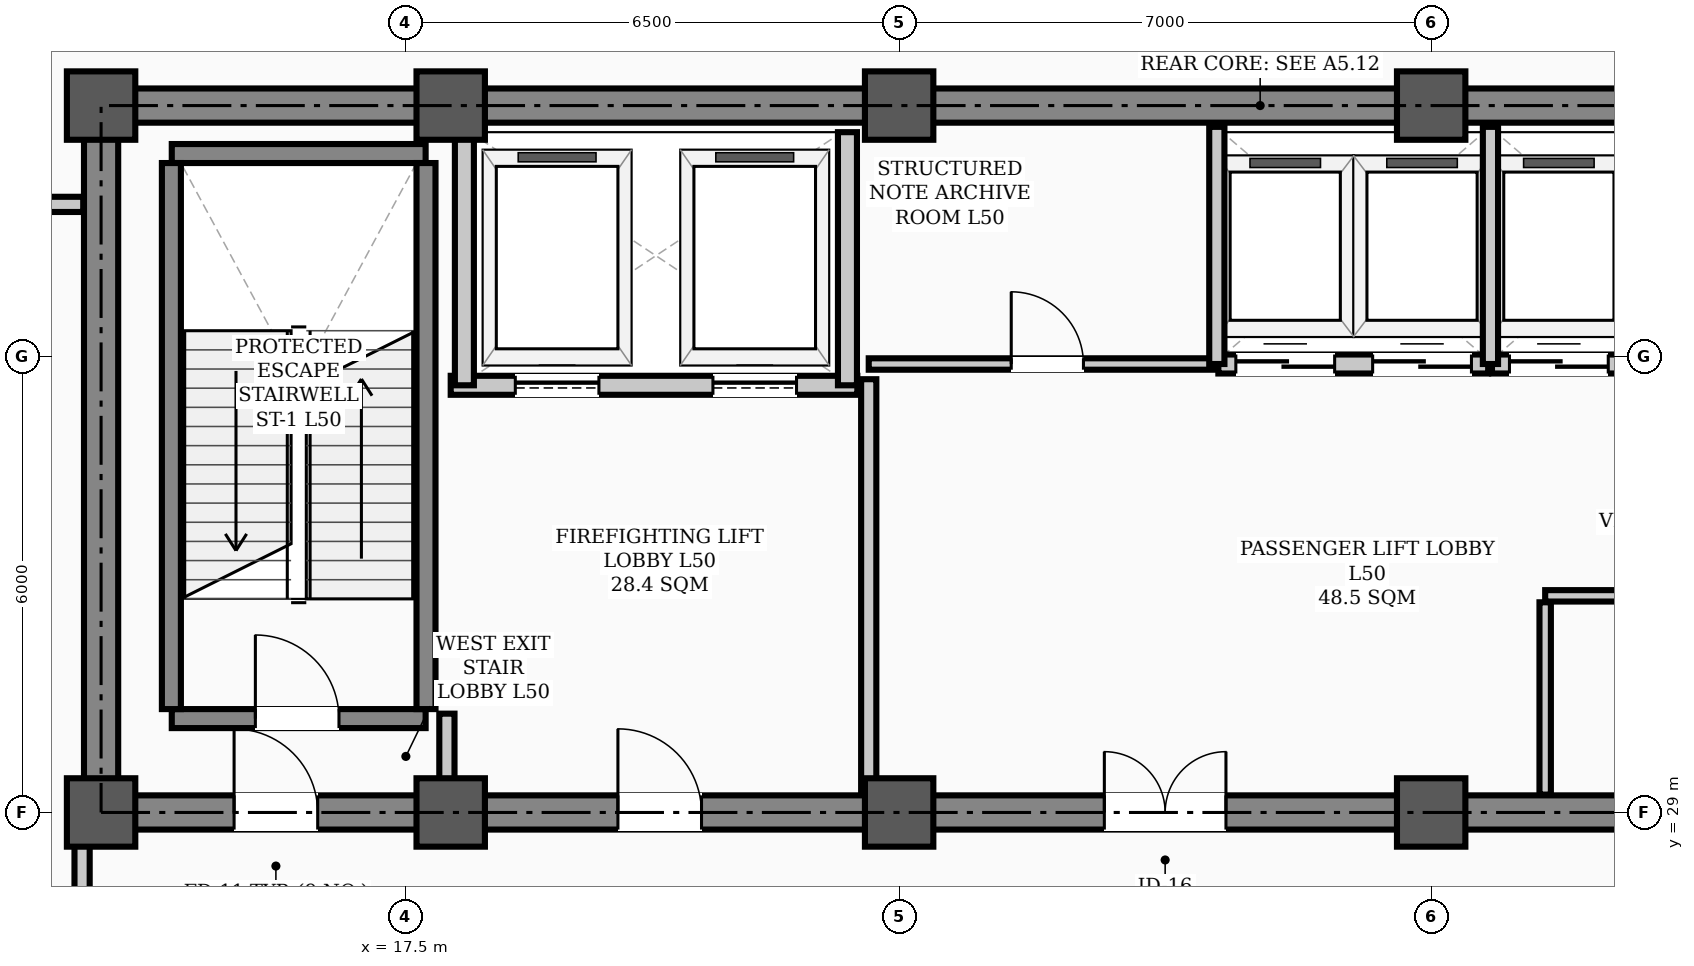
"""IFC4 building model, lengths in metres.
Left out: names, types, materials, properties, quantities, classifications, styles, units other than length and angle.
Written with IfcOpenShell. Run it as: python <this file> out.ifc"""

import sys

from ifc_helpers import new_model, si_unit, direction, frame, frame_2d, origin, origin_2d, place, context, subcontext, project, spatial, rectangle, hollow_rectangle, extrude, element, fill, save


model = new_model("IFC4")
c1 = context("Model", 3, precision=1e-05, world=origin(), true_north=direction((0.0, 1.0)))
c2 = subcontext(c1, "Body", "Model", "MODEL_VIEW")
j1 = project(units=[si_unit("LENGTHUNIT", "METRE"), si_unit("PLANEANGLEUNIT", "RADIAN")], contexts=[c1])
p1 = place(None, origin())
s1 = spatial("IfcSite", under=j1, at=p1, CompositionType="ELEMENT")
p2 = place(p1, origin())
s2 = spatial("IfcBuilding", under=s1, at=p2, CompositionType="ELEMENT")
p3 = place(p2, frame((0.0, 0.0, 200.7)))
s3 = spatial("IfcBuildingStorey", under=s2, at=p3, CompositionType="ELEMENT", Elevation=200.7)
for number, where, z_axis, x_axis in (
    (1, (13.5, 29.0, 0.0), (0.0, 0.0, 1.0), (1.0, 0.0, 0.0)),
    (2, (13.5, 38.3, 0.0), (0.0, 0.0, 1.0), (1.0, 0.0, 0.0)),
    (3, (18.1, 29.0, 0.0), (0.0, 0.0, 1.0), (1.0, 0.0, 0.0)),
    (4, (18.1, 38.3, 0.0), (0.0, 0.0, 1.0), (1.0, 0.0, 0.0)),
    (5, (24.0, 29.0, 0.0), (0.0, 0.0, 1.0), (1.0, 0.0, 0.0)),
    (6, (24.0, 38.3, 0.0), (0.0, 0.0, 1.0), (1.0, 0.0, 0.0)),
    (7, (31.0, 29.0, 0.0), (0.0, 0.0, 1.0), (1.0, 0.0, 0.0)),
    (8, (31.0, 38.3, 0.0), (0.0, 0.0, 1.0), (1.0, 0.0, 0.0)),
):
    element("IfcColumn", number, at=place(p3, frame(where, z_axis=z_axis, x_axis=x_axis)), inside=s3, PredefinedType="COLUMN", context=c2, shape_type="SweptSolid", body=[
        extrude(hollow_rectangle(XDim=0.9, YDim=0.9, WallThickness=0.035, InnerFilletRadius=0.017, OuterFilletRadius=0.052, at=origin_2d()), origin(), (0.0, 0.0, 1.0), 5.4),
    ])
p4 = place(p3, frame((13.5, 29.0, 0.0), z_axis=(0.0, 0.0, 1.0), x_axis=(1.0, 0.0, 0.0)))
e9 = element("IfcWall", 9, at=p4, inside=s3, PredefinedType="SHEAR", context=c2, shape_type="SweptSolid", body=[
    extrude(rectangle(XDim=30.5, YDim=0.45, at=frame_2d((15.25, 0.0))), origin(), (0.0, 0.0, 1.0), 5.22),
])
p5 = place(p4, frame((1.75, 0.0, 0.0)))
e10 = element("IfcOpeningElement", 10, at=p5, cuts=e9, PredefinedType="OPENING", context=c2, shape_type="SweptSolid", body=[
    extrude(rectangle(XDim=1.1, YDim=2.08, at=frame_2d((0.55, 1.04))), frame((0.0, 0.235, 0.0), z_axis=(0.0, -1.0, 0.0), x_axis=(1.0, 0.0, 0.0)), (0.0, 0.0, 1.0), 0.47),
])
p6 = place(p4, frame((26.7, 0.0, 0.0)))
e11 = element("IfcOpeningElement", 11, at=p6, cuts=e9, PredefinedType="OPENING", context=c2, shape_type="SweptSolid", body=[
    extrude(rectangle(XDim=1.1, YDim=2.08, at=frame_2d((0.55, 1.04))), frame((0.0, 0.235, 0.0), z_axis=(0.0, -1.0, 0.0), x_axis=(1.0, 0.0, 0.0)), (0.0, 0.0, 1.0), 0.47),
])
p7 = place(p4, frame((6.8, 0.0, 0.0)))
e12 = element("IfcOpeningElement", 12, at=p7, cuts=e9, PredefinedType="OPENING", context=c2, shape_type="SweptSolid", body=[
    extrude(rectangle(XDim=1.1, YDim=2.08, at=frame_2d((0.55, 1.04))), frame((0.0, 0.235, 0.0), z_axis=(0.0, -1.0, 0.0), x_axis=(1.0, 0.0, 0.0)), (0.0, 0.0, 1.0), 0.47),
])
p8 = place(p4, frame((13.2, 0.0, 0.0)))
e13 = element("IfcOpeningElement", 13, at=p8, cuts=e9, PredefinedType="OPENING", context=c2, shape_type="SweptSolid", body=[
    extrude(rectangle(XDim=1.6, YDim=2.08, at=frame_2d((0.8, 1.04))), frame((0.0, 0.235, 0.0), z_axis=(0.0, -1.0, 0.0), x_axis=(1.0, 0.0, 0.0)), (0.0, 0.0, 1.0), 0.47),
])
p9 = place(p4, frame((20.525, 0.0, 0.0)))
e14 = element("IfcOpeningElement", 14, at=p9, cuts=e9, PredefinedType="OPENING", context=c2, shape_type="SweptSolid", body=[
    extrude(rectangle(XDim=0.95, YDim=2.08, at=frame_2d((0.475, 1.04))), frame((0.0, 0.235, 0.0), z_axis=(0.0, -1.0, 0.0), x_axis=(1.0, 0.0, 0.0)), (0.0, 0.0, 1.0), 0.47),
])
p10 = place(p3, frame((13.5, 38.3, 0.0), z_axis=(0.0, 0.0, 1.0), x_axis=(1.0, 0.0, 0.0)))
e15 = element("IfcWall", 15, at=p10, inside=s3, PredefinedType="SHEAR", context=c2, shape_type="SweptSolid", body=[
    extrude(rectangle(XDim=30.5, YDim=0.45, at=frame_2d((15.25, 0.0))), origin(), (0.0, 0.0, 1.0), 5.22),
])
p11 = place(p3, frame((13.5, 29.35, 0.0), z_axis=(0.0, 0.0, 1.0), x_axis=(0.0, 1.0, 0.0)))
e16 = element("IfcWall", 16, at=p11, inside=s3, PredefinedType="SHEAR", context=c2, shape_type="SweptSolid", body=[
    extrude(rectangle(XDim=8.6, YDim=0.45, at=frame_2d((4.3, 0.0))), origin(), (0.0, 0.0, 1.0), 5.22),
])
p12 = place(p3, frame((14.43, 30.235, 0.0), z_axis=(0.0, 0.0, 1.0), x_axis=(1.0, 0.0, 0.0)))
e17 = element("IfcWall", 17, at=p12, inside=s3, PredefinedType="STANDARD", context=c2, shape_type="SweptSolid", body=[
    extrude(rectangle(XDim=3.34, YDim=0.25, at=frame_2d((1.67, 0.0))), origin(), (0.0, 0.0, 1.0), 5.22),
])
p13 = place(p12, frame((1.1, 0.0, 0.0)))
e18 = element("IfcOpeningElement", 18, at=p13, cuts=e17, PredefinedType="OPENING", context=c2, shape_type="SweptSolid", body=[
    extrude(rectangle(XDim=1.1, YDim=2.08, at=frame_2d((0.55, 1.04))), frame((0.0, 0.135, 0.0), z_axis=(0.0, -1.0, 0.0), x_axis=(1.0, 0.0, 0.0)), (0.0, 0.0, 1.0), 0.27),
])
p14 = place(p3, frame((14.43, 37.669, 0.0), z_axis=(0.0, 0.0, 1.0), x_axis=(1.0, 0.0, 0.0)))
e19 = element("IfcWall", 19, at=p14, inside=s3, PredefinedType="STANDARD", context=c2, shape_type="SweptSolid", body=[
    extrude(rectangle(XDim=3.34, YDim=0.25, at=frame_2d((1.67, 0.0))), origin(), (0.0, 0.0, 1.0), 5.22),
])
for number, where, z_axis, x_axis in (
    (20, (14.425, 30.36, 0.0), (0.0, 0.0, 1.0), (0.0, 1.0, 0.0)),
    (21, (17.775, 30.36, 0.0), (0.0, 0.0, 1.0), (0.0, 1.0, 0.0)),
):
    element("IfcWall", number, at=place(p3, frame(where, z_axis=z_axis, x_axis=x_axis)), inside=s3, PredefinedType="STANDARD", context=c2, shape_type="SweptSolid", body=[
        extrude(rectangle(XDim=7.184, YDim=0.25, at=frame_2d((3.592, 0.0))), origin(), (0.0, 0.0, 1.0), 5.22),
    ])
p15 = place(p3, frame((18.1, 34.62, 0.0), z_axis=(0.0, 0.0, 1.0), x_axis=(1.0, 0.0, 0.0)))
e22 = element("IfcWall", 22, at=p15, inside=s3, PredefinedType="STANDARD", context=c2, shape_type="SweptSolid", body=[
    extrude(rectangle(XDim=5.35, YDim=0.25, at=frame_2d((2.675, 0.0))), origin(), (0.0, 0.0, 1.0), 5.22),
])
p16 = place(p15, frame((0.85, 0.0, 0.0)))
e23 = element("IfcOpeningElement", 23, at=p16, cuts=e22, PredefinedType="OPENING", context=c2, shape_type="SweptSolid", body=[
    extrude(rectangle(XDim=1.1, YDim=2.08, at=frame_2d((0.55, 1.04))), frame((0.0, 0.135, 0.0), z_axis=(0.0, -1.0, 0.0), x_axis=(1.0, 0.0, 0.0)), (0.0, 0.0, 1.0), 0.27),
])
p17 = place(p15, frame((3.45, 0.0, 0.0)))
e24 = element("IfcOpeningElement", 24, at=p17, cuts=e22, PredefinedType="OPENING", context=c2, shape_type="SweptSolid", body=[
    extrude(rectangle(XDim=1.1, YDim=2.08, at=frame_2d((0.55, 1.04))), frame((0.0, 0.135, 0.0), z_axis=(0.0, -1.0, 0.0), x_axis=(1.0, 0.0, 0.0)), (0.0, 0.0, 1.0), 0.27),
])
for number, where, z_axis, x_axis in (
    (25, (18.28, 34.62, 0.0), (0.0, 0.0, 1.0), (0.0, 1.0, 0.0)),
    (26, (23.32, 34.62, 0.0), (0.0, 0.0, 1.0), (0.0, 1.0, 0.0)),
):
    element("IfcWall", number, at=place(p3, frame(where, z_axis=z_axis, x_axis=x_axis)), inside=s3, PredefinedType="STANDARD", context=c2, shape_type="SweptSolid", body=[
        extrude(rectangle(XDim=3.33, YDim=0.25, at=frame_2d((1.665, 0.0))), origin(), (0.0, 0.0, 1.0), 5.22),
    ])
p18 = place(p3, frame((28.2, 34.9, 0.0), z_axis=(0.0, 0.0, 1.0), x_axis=(1.0, 0.0, 0.0)))
e27 = element("IfcWall", 27, at=p18, inside=s3, PredefinedType="STANDARD", context=c2, shape_type="SweptSolid", body=[
    extrude(rectangle(XDim=3.55, YDim=0.25, at=frame_2d((1.775, 0.0))), origin(), (0.0, 0.0, 1.0), 5.22),
])
p19 = place(p18, frame((0.23, 0.0, 0.0)))
e28 = element("IfcOpeningElement", 28, at=p19, cuts=e27, PredefinedType="OPENING", context=c2, shape_type="SweptSolid", body=[
    extrude(rectangle(XDim=1.3, YDim=2.08, at=frame_2d((0.65, 1.04))), frame((0.0, 0.135, 0.0), z_axis=(0.0, -1.0, 0.0), x_axis=(1.0, 0.0, 0.0)), (0.0, 0.0, 1.0), 0.27),
])
p20 = place(p18, frame((2.03, 0.0, 0.0)))
e29 = element("IfcOpeningElement", 29, at=p20, cuts=e27, PredefinedType="OPENING", context=c2, shape_type="SweptSolid", body=[
    extrude(rectangle(XDim=1.3, YDim=2.08, at=frame_2d((0.65, 1.04))), frame((0.0, 0.135, 0.0), z_axis=(0.0, -1.0, 0.0), x_axis=(1.0, 0.0, 0.0)), (0.0, 0.0, 1.0), 0.27),
])
p21 = place(p3, frame((31.8, 34.9, 0.0), z_axis=(0.0, 0.0, 1.0), x_axis=(1.0, 0.0, 0.0)))
e30 = element("IfcWall", 30, at=p21, inside=s3, PredefinedType="STANDARD", context=c2, shape_type="SweptSolid", body=[
    extrude(rectangle(XDim=3.6, YDim=0.25, at=frame_2d((1.8, 0.0))), origin(), (0.0, 0.0, 1.0), 5.22),
])
p22 = place(p21, frame((0.23, 0.0, 0.0)))
e31 = element("IfcOpeningElement", 31, at=p22, cuts=e30, PredefinedType="OPENING", context=c2, shape_type="SweptSolid", body=[
    extrude(rectangle(XDim=1.3, YDim=2.08, at=frame_2d((0.65, 1.04))), frame((0.0, 0.135, 0.0), z_axis=(0.0, -1.0, 0.0), x_axis=(1.0, 0.0, 0.0)), (0.0, 0.0, 1.0), 0.27),
])
p23 = place(p21, frame((2.03, 0.0, 0.0)))
e32 = element("IfcOpeningElement", 32, at=p23, cuts=e30, PredefinedType="OPENING", context=c2, shape_type="SweptSolid", body=[
    extrude(rectangle(XDim=1.3, YDim=2.08, at=frame_2d((0.65, 1.04))), frame((0.0, 0.135, 0.0), z_axis=(0.0, -1.0, 0.0), x_axis=(1.0, 0.0, 0.0)), (0.0, 0.0, 1.0), 0.27),
])
p24 = place(p3, frame((23.6, 34.9, 0.0), z_axis=(0.0, 0.0, 1.0), x_axis=(1.0, 0.0, 0.0)))
e33 = element("IfcWall", 33, at=p24, inside=s3, PredefinedType="PARTITIONING", context=c2, shape_type="SweptSolid", body=[
    extrude(rectangle(XDim=4.58, YDim=0.15, at=frame_2d((2.29, 0.0))), origin(), (0.0, 0.0, 1.0), 5.22),
])
p25 = place(p24, frame((1.875, 0.0, 0.0)))
e34 = element("IfcOpeningElement", 34, at=p25, cuts=e33, PredefinedType="OPENING", context=c2, shape_type="SweptSolid", body=[
    extrude(rectangle(XDim=0.95, YDim=2.08, at=frame_2d((0.475, 1.04))), frame((0.0, 0.085, 0.0), z_axis=(0.0, -1.0, 0.0), x_axis=(1.0, 0.0, 0.0)), (0.0, 0.0, 1.0), 0.17),
])
p26 = place(p3, frame((32.5, 31.85, 0.0), z_axis=(0.0, 0.0, 1.0), x_axis=(1.0, 0.0, 0.0)))
e35 = element("IfcWall", 35, at=p26, inside=s3, PredefinedType="PARTITIONING", context=c2, shape_type="SweptSolid", body=[
    extrude(rectangle(XDim=4.1, YDim=0.15, at=frame_2d((2.05, 0.0))), origin(), (0.0, 0.0, 1.0), 5.22),
])
p27 = place(p3, frame((10.31, 37.0, 0.0), z_axis=(0.0, 0.0, 1.0), x_axis=(1.0, 0.0, 0.0)))
e36 = element("IfcWall", 36, at=p27, inside=s3, PredefinedType="STANDARD", context=c2, shape_type="SweptSolid", body=[
    extrude(rectangle(XDim=2.955, YDim=0.2, at=frame_2d((1.478, 0.0))), origin(), (0.0, 0.0, 1.0), 4.7),
])
p28 = place(p3, frame((18.05, 29.235, 0.0), z_axis=(0.0, 0.0, 1.0), x_axis=(0.0, 1.0, 0.0)))
e37 = element("IfcWall", 37, at=p28, inside=s3, PredefinedType="STANDARD", context=c2, shape_type="SweptSolid", body=[
    extrude(rectangle(XDim=1.065, YDim=0.2, at=frame_2d((0.532, 0.0))), origin(), (0.0, 0.0, 1.0), 4.85),
])
p29 = place(p3, frame((23.6, 29.235, 0.0), z_axis=(0.0, 0.0, 1.0), x_axis=(0.0, 1.0, 0.0)))
e38 = element("IfcWall", 38, at=p29, inside=s3, PredefinedType="STANDARD", context=c2, shape_type="SweptSolid", body=[
    extrude(rectangle(XDim=5.465, YDim=0.2, at=frame_2d((2.732, 0.0))), origin(), (0.0, 0.0, 1.0), 4.7),
])
p30 = place(p3, frame((32.5, 29.235, 0.0), z_axis=(0.0, 0.0, 1.0), x_axis=(0.0, 1.0, 0.0)))
e39 = element("IfcWall", 39, at=p30, inside=s3, PredefinedType="PARTITIONING", context=c2, shape_type="SweptSolid", body=[
    extrude(rectangle(XDim=2.53, YDim=0.15, at=frame_2d((1.265, 0.0))), origin(), (0.0, 0.0, 1.0), 4.85),
])
p31 = place(p3, frame((13.25, 26.11, 0.0), z_axis=(0.0, 0.0, 1.0), x_axis=(0.0, 1.0, 0.0)))
e40 = element("IfcWall", 40, at=p31, inside=s3, PredefinedType="STANDARD", context=c2, shape_type="SweptSolid", body=[
    extrude(rectangle(XDim=3.24, YDim=0.2, at=frame_2d((1.62, 0.0))), origin(), (0.0, 0.0, 1.0), 4.6),
])
p32 = place(p31, frame((0.79, 0.0, 0.0)))
e41 = element("IfcOpeningElement", 41, at=p32, cuts=e40, PredefinedType="OPENING", context=c2, shape_type="SweptSolid", body=[
    extrude(rectangle(XDim=1.1, YDim=2.08, at=frame_2d((0.55, 1.04))), frame((0.0, 0.11, 0.0), z_axis=(0.0, -1.0, 0.0), x_axis=(1.0, 0.0, 0.0)), (0.0, 0.0, 1.0), 0.22),
])
for number, where, z_axis, x_axis in (
    (42, (28.18, 34.9, 0.0), (0.0, 0.0, 1.0), (0.0, 1.0, 0.0)),
    (43, (31.78, 34.9, 0.0), (0.0, 0.0, 1.0), (0.0, 1.0, 0.0)),
):
    element("IfcWall", number, at=place(p3, frame(where, z_axis=z_axis, x_axis=x_axis)), inside=s3, PredefinedType="STANDARD", context=c2, shape_type="SweptSolid", body=[
        extrude(rectangle(XDim=3.12, YDim=0.2, at=frame_2d((1.56, 0.0))), origin(), (0.0, 0.0, 1.0), 5.22),
    ])
p33 = place(p13, origin())
e44 = element("IfcDoor", 44, at=p33, inside=s3, OperationType="SINGLE_SWING_LEFT", PredefinedType="DOOR", context=c2, shape_type="SweptSolid", body=[
    extrude(rectangle(XDim=1.1, YDim=2.08, at=frame_2d((0.55, 1.04))), frame((0.0, 0.025, 0.0), z_axis=(0.0, -1.0, 0.0), x_axis=(1.0, 0.0, 0.0)), (0.0, 0.0, 1.0), 0.05),
])
fill(e18, e44)
p34 = place(p5, origin())
e45 = element("IfcDoor", 45, at=p34, inside=s3, OperationType="SINGLE_SWING_LEFT", PredefinedType="DOOR", context=c2, shape_type="SweptSolid", body=[
    extrude(rectangle(XDim=1.1, YDim=2.08, at=frame_2d((0.55, 1.04))), frame((0.0, 0.025, 0.0), z_axis=(0.0, -1.0, 0.0), x_axis=(1.0, 0.0, 0.0)), (0.0, 0.0, 1.0), 0.05),
])
fill(e10, e45)
p35 = place(p7, origin())
e46 = element("IfcDoor", 46, at=p35, inside=s3, OperationType="SINGLE_SWING_LEFT", PredefinedType="DOOR", context=c2, shape_type="SweptSolid", body=[
    extrude(rectangle(XDim=1.1, YDim=2.08, at=frame_2d((0.55, 1.04))), frame((0.0, 0.025, 0.0), z_axis=(0.0, -1.0, 0.0), x_axis=(1.0, 0.0, 0.0)), (0.0, 0.0, 1.0), 0.05),
])
fill(e12, e46)
p36 = place(p8, origin())
e47 = element("IfcDoor", 47, at=p36, inside=s3, OperationType="DOUBLE_DOOR_SINGLE_SWING", PredefinedType="DOOR", context=c2, shape_type="SweptSolid", body=[
    extrude(rectangle(XDim=1.6, YDim=2.08, at=frame_2d((0.8, 1.04))), frame((0.0, 0.025, 0.0), z_axis=(0.0, -1.0, 0.0), x_axis=(1.0, 0.0, 0.0)), (0.0, 0.0, 1.0), 0.05),
])
fill(e13, e47)
p37 = place(p25, origin())
e48 = element("IfcDoor", 48, at=p37, inside=s3, OperationType="SINGLE_SWING_LEFT", PredefinedType="DOOR", context=c2, shape_type="SweptSolid", body=[
    extrude(rectangle(XDim=0.95, YDim=2.08, at=frame_2d((0.475, 1.04))), frame((0.0, 0.025, 0.0), z_axis=(0.0, -1.0, 0.0), x_axis=(1.0, 0.0, 0.0)), (0.0, 0.0, 1.0), 0.05),
])
fill(e34, e48)
p38 = place(p16, origin())
e49 = element("IfcDoor", 49, at=p38, inside=s3, OperationType="SLIDING_TO_LEFT", PredefinedType="DOOR", context=c2, shape_type="SweptSolid", body=[
    extrude(rectangle(XDim=1.1, YDim=2.08, at=frame_2d((0.55, 1.04))), frame((0.0, 0.025, 0.0), z_axis=(0.0, -1.0, 0.0), x_axis=(1.0, 0.0, 0.0)), (0.0, 0.0, 1.0), 0.05),
])
fill(e23, e49)
p39 = place(p17, origin())
e50 = element("IfcDoor", 50, at=p39, inside=s3, OperationType="SLIDING_TO_LEFT", PredefinedType="DOOR", context=c2, shape_type="SweptSolid", body=[
    extrude(rectangle(XDim=1.1, YDim=2.08, at=frame_2d((0.55, 1.04))), frame((0.0, 0.025, 0.0), z_axis=(0.0, -1.0, 0.0), x_axis=(1.0, 0.0, 0.0)), (0.0, 0.0, 1.0), 0.05),
])
fill(e24, e50)
p40 = place(p19, origin())
e51 = element("IfcDoor", 51, at=p40, inside=s3, OperationType="DOUBLE_DOOR_SLIDING", PredefinedType="DOOR", context=c2, shape_type="SweptSolid", body=[
    extrude(rectangle(XDim=1.3, YDim=2.08, at=frame_2d((0.65, 1.04))), frame((0.0, 0.025, 0.0), z_axis=(0.0, -1.0, 0.0), x_axis=(1.0, 0.0, 0.0)), (0.0, 0.0, 1.0), 0.05),
])
fill(e28, e51)
p41 = place(p20, origin())
e52 = element("IfcDoor", 52, at=p41, inside=s3, OperationType="DOUBLE_DOOR_SLIDING", PredefinedType="DOOR", context=c2, shape_type="SweptSolid", body=[
    extrude(rectangle(XDim=1.3, YDim=2.08, at=frame_2d((0.65, 1.04))), frame((0.0, 0.025, 0.0), z_axis=(0.0, -1.0, 0.0), x_axis=(1.0, 0.0, 0.0)), (0.0, 0.0, 1.0), 0.05),
])
fill(e29, e52)
p42 = place(p22, origin())
e53 = element("IfcDoor", 53, at=p42, inside=s3, OperationType="DOUBLE_DOOR_SLIDING", PredefinedType="DOOR", context=c2, shape_type="SweptSolid", body=[
    extrude(rectangle(XDim=1.3, YDim=2.08, at=frame_2d((0.65, 1.04))), frame((0.0, 0.025, 0.0), z_axis=(0.0, -1.0, 0.0), x_axis=(1.0, 0.0, 0.0)), (0.0, 0.0, 1.0), 0.05),
])
fill(e31, e53)
save(model, sys.argv[1])
